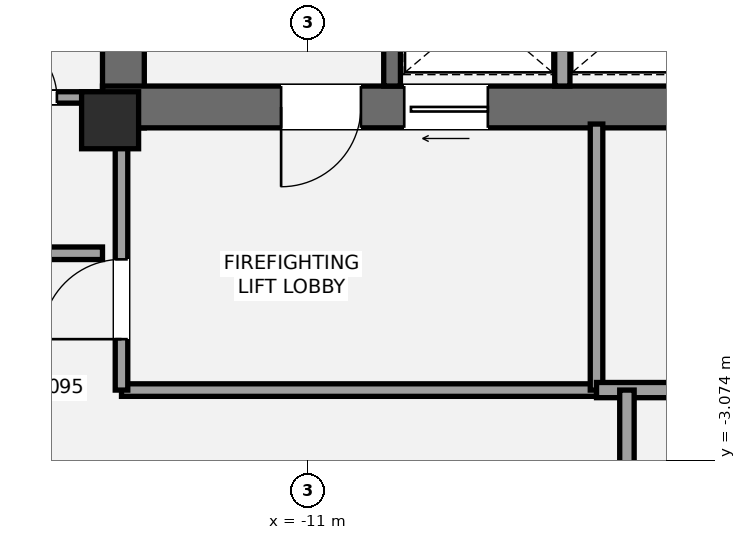
"""IFC4 building model, lengths in metres.
Left out: names, types, materials, properties, quantities, classifications, styles, units other than length and angle.
Written with IfcOpenShell. Run it as: python <this file> out.ifc"""

import sys

from ifc_helpers import new_model, si_unit, direction, frame, frame_2d, origin, origin_2d, place, context, subcontext, project, spatial, rectangle, extrude, element, fill, save


model = new_model("IFC4")
c1 = context("Model", 3, precision=1e-05, world=origin(), true_north=direction((0.0, 1.0)))
c2 = subcontext(c1, "Body", "Model", "MODEL_VIEW")
j1 = project(units=[si_unit("LENGTHUNIT", "METRE"), si_unit("PLANEANGLEUNIT", "RADIAN")], contexts=[c1])
p1 = place(None, origin())
s1 = spatial("IfcSite", under=j1, at=p1, CompositionType="ELEMENT")
p2 = place(p1, origin())
s2 = spatial("IfcBuilding", under=s1, at=p2, CompositionType="ELEMENT")
p3 = place(p2, frame((0.0, 0.0, 222.6)))
s3 = spatial("IfcBuildingStorey", under=s2, at=p3, CompositionType="ELEMENT", Elevation=222.6)
p4 = place(p3, frame((-13.425, 1.3, 0.0), z_axis=(0.0, 0.0, 1.0), x_axis=(0.0, 1.0, 0.0)))
e1 = element("IfcWall", 1, at=p4, inside=s3, PredefinedType="SHEAR", context=c2, shape_type="SweptSolid", body=[
    extrude(rectangle(XDim=8.25, YDim=0.55, at=frame_2d((4.125, 0.0))), origin(), (0.0, 0.0, 1.0), 3.15),
])
p5 = place(p3, frame((-4.925, 1.575, 0.0), z_axis=(0.0, 0.0, 1.0), x_axis=(-1.0, 0.0, 0.0)))
e2 = element("IfcWall", 2, at=p5, inside=s3, PredefinedType="SHEAR", context=c2, shape_type="SweptSolid", body=[
    extrude(rectangle(XDim=8.775, YDim=0.55, at=frame_2d((4.387, 0.0))), origin(), (0.0, 0.0, 1.0), 3.15),
])
p6 = place(p5, frame((5.375, 0.0, 0.0)))
e3 = element("IfcOpeningElement", 3, at=p6, cuts=e2, PredefinedType="OPENING", context=c2, shape_type="SweptSolid", body=[
    extrude(rectangle(XDim=1.05, YDim=2.15, at=frame_2d((0.525, 1.075))), frame((0.0, 0.285, 0.0), z_axis=(0.0, -1.0, 0.0), x_axis=(1.0, 0.0, 0.0)), (0.0, 0.0, 1.0), 0.57),
])
p7 = place(p5, frame((3.705, 0.0, 0.0)))
e4 = element("IfcOpeningElement", 4, at=p7, cuts=e2, PredefinedType="OPENING", context=c2, shape_type="SweptSolid", body=[
    extrude(rectangle(XDim=1.1, YDim=2.2, at=frame_2d((0.55, 1.1))), frame((0.0, 0.285, 0.0), z_axis=(0.0, -1.0, 0.0), x_axis=(1.0, 0.0, 0.0)), (0.0, 0.0, 1.0), 0.57),
])
p8 = place(p3, frame((-9.89, 1.85, 0.0), z_axis=(0.0, 0.0, 1.0), x_axis=(0.0, 1.0, 0.0)))
e5 = element("IfcWall", 5, at=p8, inside=s3, PredefinedType="SHEAR", context=c2, shape_type="SweptSolid", body=[
    extrude(rectangle(XDim=7.15, YDim=0.22, at=frame_2d((3.575, 0.0))), origin(), (0.0, 0.0, 1.0), 3.15),
])
p9 = place(p3, frame((-13.6, 1.4, 0.0), z_axis=(0.0, 0.0, 1.0), x_axis=(1.0, 0.0, 0.0)))
e6 = element("IfcColumn", 6, at=p9, inside=s3, PredefinedType="PILASTER", context=c2, shape_type="SweptSolid", body=[
    extrude(rectangle(XDim=0.75, YDim=0.75, at=origin_2d()), origin(), (0.0, 0.0, 1.0), 3.15),
])
p10 = place(p3, frame((-13.45, -2.15, 0.0), z_axis=(0.0, 0.0, 1.0), x_axis=(1.0, 0.0, 0.0)))
e7 = element("IfcWall", 7, at=p10, inside=s3, PredefinedType="PARTITIONING", context=c2, shape_type="SweptSolid", body=[
    extrude(rectangle(XDim=6.25, YDim=0.165, at=frame_2d((3.125, 0.0))), origin(), (0.0, 0.0, 1.0), 2.423),
])
p11 = place(p3, frame((-13.45, -2.15, 0.0), z_axis=(0.0, 0.0, 1.0), x_axis=(0.0, 1.0, 0.0)))
e8 = element("IfcWall", 8, at=p11, inside=s3, PredefinedType="PARTITIONING", context=c2, shape_type="SweptSolid", body=[
    extrude(rectangle(XDim=3.5, YDim=0.165, at=frame_2d((1.75, 0.0))), origin(), (0.0, 0.0, 1.0), 2.423),
])
p12 = place(p11, frame((0.67, 0.0, 0.0)))
e9 = element("IfcOpeningElement", 9, at=p12, cuts=e8, PredefinedType="OPENING", context=c2, shape_type="SweptSolid", body=[
    extrude(rectangle(XDim=1.05, YDim=2.15, at=frame_2d((0.525, 1.075))), frame((0.0, 0.093, 0.0), z_axis=(0.0, -1.0, 0.0), x_axis=(1.0, 0.0, 0.0)), (0.0, 0.0, 1.0), 0.185),
])
p13 = place(p3, frame((-7.2, -2.15, 0.0), z_axis=(0.0, 0.0, 1.0), x_axis=(0.0, 1.0, 0.0)))
e10 = element("IfcWall", 10, at=p13, inside=s3, PredefinedType="PARTITIONING", context=c2, shape_type="SweptSolid", body=[
    extrude(rectangle(XDim=3.5, YDim=0.165, at=frame_2d((1.75, 0.0))), origin(), (0.0, 0.0, 1.0), 2.423),
])
p14 = place(p3, frame((-7.2, -2.15, 0.0), z_axis=(0.0, 0.0, 1.0), x_axis=(1.0, 0.0, 0.0)))
e11 = element("IfcWall", 11, at=p14, inside=s3, PredefinedType="SOLIDWALL", context=c2, shape_type="SweptSolid", body=[
    extrude(rectangle(XDim=2.25, YDim=0.2, at=frame_2d((1.125, 0.0))), origin(), (0.0, 0.0, 1.0), 2.97),
])
p15 = place(p3, frame((-7.65, 1.85, 0.0), z_axis=(0.0, 0.0, 1.0), x_axis=(0.0, 1.0, 0.0)))
e12 = element("IfcWall", 12, at=p15, inside=s3, PredefinedType="SOLIDWALL", context=c2, shape_type="SweptSolid", body=[
    extrude(rectangle(XDim=1.93, YDim=0.2, at=frame_2d((0.965, 0.0))), origin(), (0.0, 0.0, 1.0), 2.97),
])
p16 = place(p3, frame((-6.8, -4.05, 0.0), z_axis=(0.0, 0.0, 1.0), x_axis=(0.0, 1.0, 0.0)))
e13 = element("IfcWall", 13, at=p16, inside=s3, PredefinedType="PLUMBINGWALL", context=c2, shape_type="SweptSolid", body=[
    extrude(rectangle(XDim=1.9, YDim=0.19, at=frame_2d((0.95, 0.0))), origin(), (0.0, 0.0, 1.0), 2.423),
])
p17 = place(p3, frame((-15.65, -0.35, 0.0), z_axis=(0.0, 0.0, 1.0), x_axis=(1.0, 0.0, 0.0)))
e14 = element("IfcWall", 14, at=p17, inside=s3, PredefinedType="PARTITIONING", context=c2, shape_type="SweptSolid", body=[
    extrude(rectangle(XDim=1.95, YDim=0.165, at=frame_2d((0.975, 0.0))), origin(), (0.0, 0.0, 1.0), 2.97),
])
p18 = place(p3, frame((-17.95, 1.7, 0.0), z_axis=(0.0, 0.0, 1.0), x_axis=(1.0, 0.0, 0.0)))
e15 = element("IfcWall", 15, at=p18, inside=s3, PredefinedType="PLUMBINGWALL", context=c2, shape_type="SweptSolid", body=[
    extrude(rectangle(XDim=4.25, YDim=0.15, at=frame_2d((2.125, 0.0))), origin(), (0.0, 0.0, 1.0), 2.423),
])
p19 = place(p18, frame((2.85, 0.0, 0.0)))
e16 = element("IfcOpeningElement", 16, at=p19, cuts=e15, PredefinedType="OPENING", context=c2, shape_type="SweptSolid", body=[
    extrude(rectangle(XDim=0.8, YDim=2.1, at=frame_2d((0.4, 1.05))), frame((0.0, 0.085, 0.0), z_axis=(0.0, -1.0, 0.0), x_axis=(1.0, 0.0, 0.0)), (0.0, 0.0, 1.0), 0.17),
])
p20 = place(p18, frame((1.27, 0.0, 0.0)))
e17 = element("IfcOpeningElement", 17, at=p20, cuts=e15, PredefinedType="OPENING", context=c2, shape_type="SweptSolid", body=[
    extrude(rectangle(XDim=0.85, YDim=2.1, at=frame_2d((0.425, 1.05))), frame((0.0, 0.085, 0.0), z_axis=(0.0, -1.0, 0.0), x_axis=(1.0, 0.0, 0.0)), (0.0, 0.0, 1.0), 0.17),
])
p21 = place(p6, origin())
e18 = element("IfcDoor", 18, at=p21, inside=s3, OperationType="SINGLE_SWING_RIGHT", PredefinedType="DOOR", context=c2, shape_type="SweptSolid", body=[
    extrude(rectangle(XDim=1.05, YDim=2.15, at=frame_2d((0.525, 1.075))), frame((0.0, 0.025, 0.0), z_axis=(0.0, -1.0, 0.0), x_axis=(1.0, 0.0, 0.0)), (0.0, 0.0, 1.0), 0.05),
])
fill(e3, e18)
p22 = place(p12, origin())
e19 = element("IfcDoor", 19, at=p22, inside=s3, OperationType="SINGLE_SWING_LEFT", PredefinedType="DOOR", context=c2, shape_type="SweptSolid", body=[
    extrude(rectangle(XDim=1.05, YDim=2.15, at=frame_2d((0.525, 1.075))), frame((0.0, 0.025, 0.0), z_axis=(0.0, -1.0, 0.0), x_axis=(1.0, 0.0, 0.0)), (0.0, 0.0, 1.0), 0.05),
])
fill(e9, e19)
p23 = place(p7, origin())
e20 = element("IfcDoor", 20, at=p23, inside=s3, OperationType="SLIDING_TO_LEFT", PredefinedType="DOOR", context=c2, shape_type="SweptSolid", body=[
    extrude(rectangle(XDim=1.1, YDim=2.2, at=frame_2d((0.55, 1.1))), frame((0.0, 0.025, 0.0), z_axis=(0.0, -1.0, 0.0), x_axis=(1.0, 0.0, 0.0)), (0.0, 0.0, 1.0), 0.05),
])
fill(e4, e20)
p24 = place(p19, origin())
e21 = element("IfcDoor", 21, at=p24, inside=s3, OperationType="SINGLE_SWING_LEFT", PredefinedType="DOOR", context=c2, shape_type="SweptSolid", body=[
    extrude(rectangle(XDim=0.8, YDim=2.1, at=frame_2d((0.4, 1.05))), frame((0.0, 0.025, 0.0), z_axis=(0.0, -1.0, 0.0), x_axis=(1.0, 0.0, 0.0)), (0.0, 0.0, 1.0), 0.05),
])
fill(e16, e21)
save(model, sys.argv[1])
